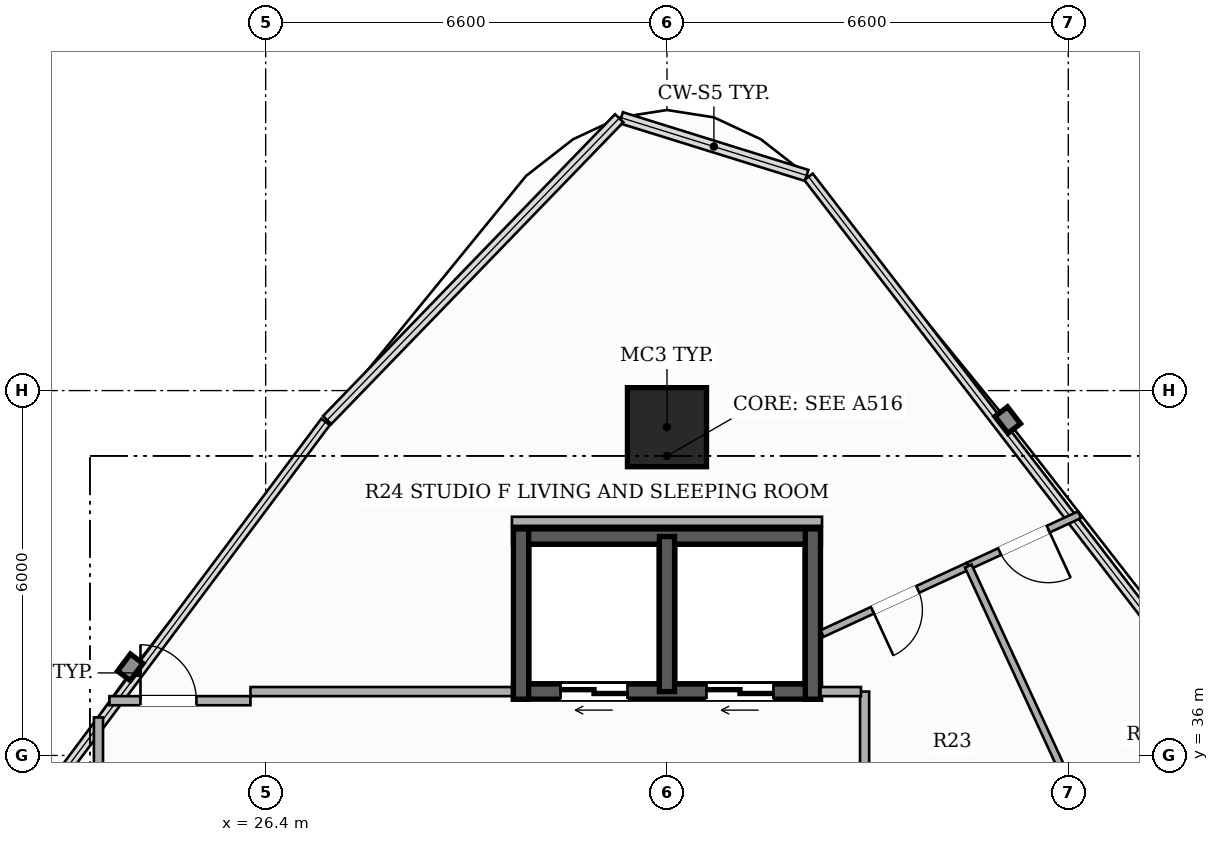
"""IFC4 building model, lengths in metres.
Left out: names, types, materials, properties, quantities, classifications, styles, units other than length and angle.
Written with IfcOpenShell. Run it as: python <this file> out.ifc"""

import sys

from ifc_helpers import new_model, si_unit, direction, frame, frame_2d, origin, origin_2d, place, context, subcontext, project, spatial, rectangle, hollow_rectangle, extrude, element, fill, save


model = new_model("IFC4")
c1 = context("Model", 3, precision=1e-05, world=origin(), true_north=direction((0.0, 1.0)))
c2 = subcontext(c1, "Body", "Model", "MODEL_VIEW")
j1 = project(units=[si_unit("LENGTHUNIT", "METRE"), si_unit("PLANEANGLEUNIT", "RADIAN")], contexts=[c1])
p1 = place(None, origin())
s1 = spatial("IfcSite", under=j1, at=p1, CompositionType="ELEMENT")
p2 = place(p1, origin())
s2 = spatial("IfcBuilding", under=s1, at=p2, CompositionType="ELEMENT")
p3 = place(p2, frame((0.0, 0.0, 196.4)))
s3 = spatial("IfcBuildingStorey", under=s2, at=p3, CompositionType="ELEMENT", Elevation=196.4)
p4 = place(p3, frame((35.525, 37.05, 0.0), z_axis=(0.0, 0.0, 1.0), x_axis=(-1.0, 0.0, 0.0)))
e1 = element("IfcWall", 1, at=p4, inside=s3, PredefinedType="SHEAR", context=c2, shape_type="SweptSolid", body=[
    extrude(rectangle(XDim=5.05, YDim=0.25, at=frame_2d((2.525, 0.0))), origin(), (0.0, 0.0, 1.0), 3.3),
])
p5 = place(p4, frame((3.175, 0.0, 0.0)))
e2 = element("IfcOpeningElement", 2, at=p5, cuts=e1, PredefinedType="OPENING", context=c2, shape_type="SweptSolid", body=[
    extrude(rectangle(XDim=1.1, YDim=2.2, at=frame_2d((0.55, 1.1))), frame((0.0, 0.135, 0.0), z_axis=(0.0, -1.0, 0.0), x_axis=(1.0, 0.0, 0.0)), (0.0, 0.0, 1.0), 0.27),
])
p6 = place(p4, frame((0.775, 0.0, 0.0)))
e3 = element("IfcOpeningElement", 3, at=p6, cuts=e1, PredefinedType="OPENING", context=c2, shape_type="SweptSolid", body=[
    extrude(rectangle(XDim=1.1, YDim=2.2, at=frame_2d((0.55, 1.1))), frame((0.0, 0.135, 0.0), z_axis=(0.0, -1.0, 0.0), x_axis=(1.0, 0.0, 0.0)), (0.0, 0.0, 1.0), 0.27),
])
p7 = place(p3, frame((30.475, 39.6, 0.0), z_axis=(0.0, 0.0, 1.0), x_axis=(1.0, 0.0, 0.0)))
e4 = element("IfcWall", 4, at=p7, inside=s3, PredefinedType="SHEAR", context=c2, shape_type="SweptSolid", body=[
    extrude(rectangle(XDim=5.05, YDim=0.25, at=frame_2d((2.525, 0.0))), origin(), (0.0, 0.0, 1.0), 3.3),
])
for number, where, z_axis, x_axis in (
    (5, (30.6, 36.925, 0.0), (0.0, 0.0, 1.0), (0.0, 1.0, 0.0)),
    (6, (35.4, 36.925, 0.0), (0.0, 0.0, 1.0), (0.0, 1.0, 0.0)),
):
    element("IfcWall", number, at=place(p3, frame(where, z_axis=z_axis, x_axis=x_axis)), inside=s3, PredefinedType="SHEAR", context=c2, shape_type="SweptSolid", body=[
        extrude(rectangle(XDim=2.8, YDim=0.25, at=frame_2d((1.4, 0.0))), origin(), (0.0, 0.0, 1.0), 3.3),
    ])
p8 = place(p3, frame((33.0, 37.05, 0.0), z_axis=(0.0, 0.0, 1.0), x_axis=(0.0, 1.0, 0.0)))
e7 = element("IfcWall", 7, at=p8, inside=s3, PredefinedType="SHEAR", context=c2, shape_type="SweptSolid", body=[
    extrude(rectangle(XDim=2.55, YDim=0.25, at=frame_2d((1.275, 0.0))), origin(), (0.0, 0.0, 1.0), 3.3),
])
p9 = place(p3, frame((33.0, 41.398, 0.0), z_axis=(0.0, 0.0, 1.0), x_axis=(1.0, 0.0, 0.0)))
e8 = element("IfcColumn", 8, at=p9, inside=s3, PredefinedType="COLUMN", context=c2, shape_type="SweptSolid", body=[
    extrude(hollow_rectangle(XDim=1.3, YDim=1.3, WallThickness=0.04, at=origin_2d()), origin(), (0.0, 0.0, 1.0), 3.3),
])
p10 = place(p3, frame((36.25, 34.76, 0.0), z_axis=(0.0, 0.0, 1.0), x_axis=(0.0, 1.0, 0.0)))
e9 = element("IfcWall", 9, at=p10, inside=s3, PredefinedType="PARTITIONING", context=c2, shape_type="SweptSolid", body=[
    extrude(rectangle(XDim=2.29, YDim=0.15, at=frame_2d((1.145, 0.0))), origin(), (0.0, 0.0, 1.0), 2.425),
])
p11 = place(p3, frame((35.525, 37.05, 0.0), z_axis=(0.0, 0.0, 1.0), x_axis=(1.0, 0.0, 0.0)))
e10 = element("IfcWall", 10, at=p11, inside=s3, PredefinedType="PARTITIONING", context=c2, shape_type="SweptSolid", body=[
    extrude(rectangle(XDim=0.665, YDim=0.15, at=frame_2d((0.333, 0.0))), origin(), (0.0, 0.0, 1.0), 2.425),
])
p12 = place(p3, frame((23.65, 23.91, 0.0), z_axis=(0.0, 0.0, 1.0), x_axis=(0.0, 1.0, 0.0)))
e11 = element("IfcWall", 11, at=p12, inside=s3, PredefinedType="PARTITIONING", context=c2, shape_type="SweptSolid", body=[
    extrude(rectangle(XDim=12.715, YDim=0.15, at=frame_2d((6.357, 0.0))), origin(), (0.0, 0.0, 1.0), 2.492),
])
p13 = place(p12, frame((5.917, 0.0, 0.0)))
e12 = element("IfcOpeningElement", 12, at=p13, cuts=e11, PredefinedType="OPENING", context=c2, shape_type="SweptSolid", body=[
    extrude(rectangle(XDim=0.88, YDim=2.1, at=frame_2d((0.44, 1.05))), frame((0.0, 0.085, 0.0), z_axis=(0.0, -1.0, 0.0), x_axis=(1.0, 0.0, 0.0)), (0.0, 0.0, 1.0), 0.17),
])
p14 = place(p3, frame((23.831, 36.9, 0.0), z_axis=(0.0, 0.0, 1.0), x_axis=(1.0, 0.0, 0.0)))
e13 = element("IfcWall", 13, at=p14, inside=s3, PredefinedType="PARTITIONING", context=c2, shape_type="SweptSolid", body=[
    extrude(rectangle(XDim=2.319, YDim=0.15, at=frame_2d((1.159, 0.0))), origin(), (0.0, 0.0, 1.0), 2.619),
])
p15 = place(p14, frame((0.51, 0.0, 0.0)))
e14 = element("IfcOpeningElement", 14, at=p15, cuts=e13, PredefinedType="OPENING", context=c2, shape_type="SweptSolid", body=[
    extrude(rectangle(XDim=0.92, YDim=2.15, at=frame_2d((0.46, 1.075))), frame((0.0, 0.085, 0.0), z_axis=(0.0, -1.0, 0.0), x_axis=(1.0, 0.0, 0.0)), (0.0, 0.0, 1.0), 0.17),
])
p16 = place(p3, frame((26.15, 37.05, 0.0), z_axis=(0.0, 0.0, 1.0), x_axis=(1.0, 0.0, 0.0)))
e15 = element("IfcWall", 15, at=p16, inside=s3, PredefinedType="PARTITIONING", context=c2, shape_type="SweptSolid", body=[
    extrude(rectangle(XDim=4.3, YDim=0.15, at=frame_2d((2.15, 0.0))), origin(), (0.0, 0.0, 1.0), 2.425),
])
p17 = place(p3, frame((30.45, 39.85, 0.0), z_axis=(0.0, 0.0, 1.0), x_axis=(1.0, 0.0, 0.0)))
e16 = element("IfcWall", 16, at=p17, inside=s3, PredefinedType="PARTITIONING", context=c2, shape_type="SweptSolid", body=[
    extrude(rectangle(XDim=5.1, YDim=0.15, at=frame_2d((2.55, 0.0))), origin(), (0.0, 0.0, 1.0), 2.492),
])
p18 = place(p3, frame((37.955, 39.114, 0.0), z_axis=(0.0, 0.0, 1.0), x_axis=(-0.907945896046, -0.41908740121, 0.0)))
e17 = element("IfcWall", 17, at=p18, inside=s3, PredefinedType="PARTITIONING", context=c2, shape_type="SweptSolid", body=[
    extrude(rectangle(XDim=2.649, YDim=0.12, at=frame_2d((1.324, 0.0))), origin(), (0.0, 0.0, 1.0), 2.492),
])
p19 = place(p18, frame((0.914, 0.0, 0.0)))
e18 = element("IfcOpeningElement", 18, at=p19, cuts=e17, PredefinedType="OPENING", context=c2, shape_type="SweptSolid", body=[
    extrude(rectangle(XDim=0.82, YDim=2.1, at=frame_2d((0.41, 1.05))), frame((0.0, 0.07, 0.0), z_axis=(0.0, -1.0, 0.0), x_axis=(1.0, 0.0, 0.0)), (0.0, 0.0, 1.0), 0.14),
])
p20 = place(p3, frame((39.786, 39.959, 0.0), z_axis=(0.0, 0.0, 1.0), x_axis=(-0.90796292821, -0.419050499338, 0.0)))
e19 = element("IfcWall", 19, at=p20, inside=s3, PredefinedType="PARTITIONING", context=c2, shape_type="SweptSolid", body=[
    extrude(rectangle(XDim=2.016, YDim=0.12, at=frame_2d((1.008, 0.0))), origin(), (0.0, 0.0, 1.0), 3.06),
])
p21 = place(p20, frame((0.568, 0.0, 0.0)))
e20 = element("IfcOpeningElement", 20, at=p21, cuts=e19, PredefinedType="OPENING", context=c2, shape_type="SweptSolid", body=[
    extrude(rectangle(XDim=0.88, YDim=2.1, at=frame_2d((0.44, 1.05))), frame((0.0, 0.07, 0.0), z_axis=(0.0, -1.0, 0.0), x_axis=(1.0, 0.0, 0.0)), (0.0, 0.0, 1.0), 0.14),
])
p22 = place(p3, frame((37.955, 39.114, 0.0), z_axis=(0.0, 0.0, 1.0), x_axis=(0.41911319203, -0.907933991139, 0.0)))
e21 = element("IfcWall", 21, at=p22, inside=s3, PredefinedType="PARTITIONING", context=c2, shape_type="SweptSolid", body=[
    extrude(rectangle(XDim=5.628, YDim=0.12, at=frame_2d((2.814, 0.0))), origin(), (0.0, 0.0, 1.0), 2.492),
])
p23 = place(p5, origin())
e22 = element("IfcDoor", 22, at=p23, inside=s3, OperationType="DOUBLE_DOOR_SLIDING", PredefinedType="DOOR", context=c2, shape_type="SweptSolid", body=[
    extrude(rectangle(XDim=1.1, YDim=2.2, at=frame_2d((0.55, 1.1))), frame((0.0, 0.025, 0.0), z_axis=(0.0, -1.0, 0.0), x_axis=(1.0, 0.0, 0.0)), (0.0, 0.0, 1.0), 0.05),
])
fill(e2, e22)
p24 = place(p6, origin())
e23 = element("IfcDoor", 23, at=p24, inside=s3, OperationType="DOUBLE_DOOR_SLIDING", PredefinedType="DOOR", context=c2, shape_type="SweptSolid", body=[
    extrude(rectangle(XDim=1.1, YDim=2.2, at=frame_2d((0.55, 1.1))), frame((0.0, 0.025, 0.0), z_axis=(0.0, -1.0, 0.0), x_axis=(1.0, 0.0, 0.0)), (0.0, 0.0, 1.0), 0.05),
])
fill(e3, e23)
p25 = place(p15, origin())
e24 = element("IfcDoor", 24, at=p25, inside=s3, OperationType="SINGLE_SWING_LEFT", PredefinedType="DOOR", context=c2, shape_type="SweptSolid", body=[
    extrude(rectangle(XDim=0.92, YDim=2.15, at=frame_2d((0.46, 1.075))), frame((0.0, 0.025, 0.0), z_axis=(0.0, -1.0, 0.0), x_axis=(1.0, 0.0, 0.0)), (0.0, 0.0, 1.0), 0.05),
])
fill(e14, e24)
p26 = place(p19, origin())
e25 = element("IfcDoor", 25, at=p26, inside=s3, OperationType="SINGLE_SWING_RIGHT", PredefinedType="DOOR", context=c2, shape_type="SweptSolid", body=[
    extrude(rectangle(XDim=0.82, YDim=2.1, at=frame_2d((0.41, 1.05))), frame((0.0, 0.025, 0.0), z_axis=(0.0, -1.0, 0.0), x_axis=(1.0, 0.0, 0.0)), (0.0, 0.0, 1.0), 0.05),
])
fill(e18, e25)
p27 = place(p21, origin())
e26 = element("IfcDoor", 26, at=p27, inside=s3, OperationType="SINGLE_SWING_LEFT", PredefinedType="DOOR", context=c2, shape_type="SweptSolid", body=[
    extrude(rectangle(XDim=0.88, YDim=2.1, at=frame_2d((0.44, 1.05))), frame((0.0, 0.025, 0.0), z_axis=(0.0, -1.0, 0.0), x_axis=(1.0, 0.0, 0.0)), (0.0, 0.0, 1.0), 0.05),
])
fill(e20, e26)
save(model, sys.argv[1])
